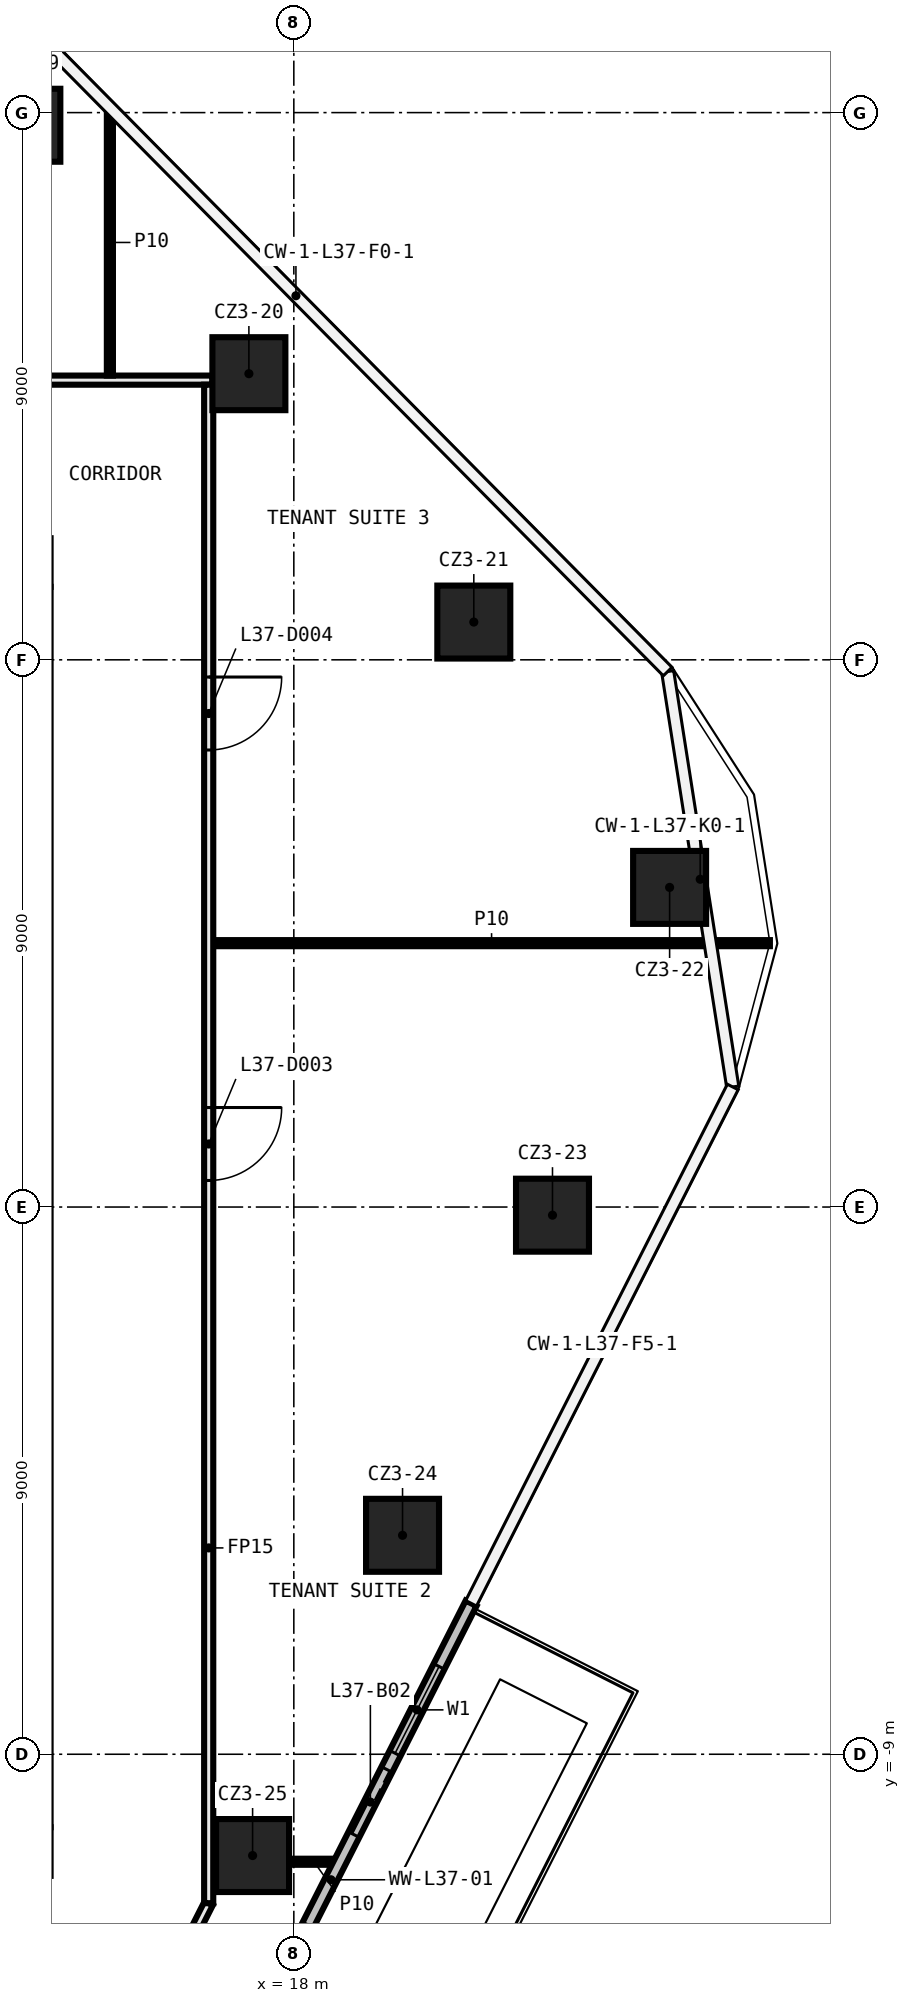
"""IFC4 building model, lengths in metres.
Left out: names, types, materials, properties, quantities, classifications, styles, units other than length and angle.
Written with IfcOpenShell. Run it as: python <this file> out.ifc"""

import sys

from ifc_helpers import new_model, si_unit, direction, frame, frame_2d, origin, origin_2d, place, context, subcontext, project, spatial, rectangle, extrude, element, fill, save


model = new_model("IFC4")
c1 = context("Model", 3, precision=1e-05, world=origin(), true_north=direction((0.0, 1.0)))
c2 = subcontext(c1, "Body", "Model", "MODEL_VIEW")
j1 = project(units=[si_unit("LENGTHUNIT", "METRE"), si_unit("PLANEANGLEUNIT", "RADIAN")], contexts=[c1])
p1 = place(None, origin())
s1 = spatial("IfcSite", under=j1, at=p1, CompositionType="ELEMENT")
p2 = place(p1, origin())
s2 = spatial("IfcBuilding", under=s1, at=p2, CompositionType="ELEMENT")
p3 = place(p2, frame((0.0, 0.0, 171.2)))
s3 = spatial("IfcBuildingStorey", under=s2, at=p3, CompositionType="ELEMENT", Elevation=171.2)
for number, where, z_axis, x_axis in (
    (1, (13.56, 17.792, 0.0), (0.0, 0.0, 1.0), (1.0, 0.0, 0.0)),
    (2, (17.261, 13.706, 0.0), (0.0, 0.0, 1.0), (1.0, 0.0, 0.0)),
    (3, (20.96, 9.621, 0.0), (0.0, 0.0, 1.0), (1.0, 0.0, 0.0)),
    (4, (24.18, 5.257, 0.0), (0.0, 0.0, 1.0), (1.0, 0.0, 0.0)),
    (5, (22.254, -0.134, 0.0), (0.0, 0.0, 1.0), (1.0, 0.0, 0.0)),
    (6, (19.788, -5.399, 0.0), (0.0, 0.0, 1.0), (1.0, 0.0, 0.0)),
    (7, (17.322, -10.666, 0.0), (0.0, 0.0, 1.0), (1.0, 0.0, 0.0)),
):
    element("IfcColumn", number, at=place(p3, frame(where, z_axis=z_axis, x_axis=x_axis)), inside=s3, PredefinedType="COLUMN", context=c2, shape_type="SweptSolid", body=[
        extrude(rectangle(XDim=1.2, YDim=1.2, at=origin_2d()), origin(), (0.0, 0.0, 1.0), 3.82),
    ])
p4 = place(p3, frame((17.922, -10.768, 0.0), z_axis=(0.0, 0.0, 1.0), x_axis=(1.0, 0.0, 0.0)))
e8 = element("IfcWall", 8, at=p4, inside=s3, PredefinedType="PARTITIONING", context=c2, shape_type="SweptSolid", body=[
    extrude(rectangle(XDim=0.817, YDim=0.1, at=frame_2d((0.409, 0.0))), origin(), (0.0, 0.0, 1.0), 3.82),
])
p5 = place(p3, frame((16.675, 4.34, 0.0), z_axis=(0.0, 0.0, 1.0), x_axis=(1.0, 0.0, 0.0)))
e9 = element("IfcWall", 9, at=p5, inside=s3, PredefinedType="PARTITIONING", context=c2, shape_type="SweptSolid", body=[
    extrude(rectangle(XDim=9.154, YDim=0.1, at=frame_2d((4.577, 0.0))), origin(), (0.0, 0.0, 1.0), 3.82),
])
p6 = place(p3, frame((-15.842, 13.6, 0.0), z_axis=(0.0, 0.0, 1.0), x_axis=(1.0, 0.0, 0.0)))
e10 = element("IfcWall", 10, at=p6, inside=s3, PredefinedType="PARTITIONING", context=c2, shape_type="SweptSolid", body=[
    extrude(rectangle(XDim=32.502, YDim=0.15, at=frame_2d((16.251, 0.0))), origin(), (0.0, 0.0, 1.0), 3.82),
])
p7 = place(p6, frame((21.974, 0.0, 0.0)))
e11 = element("IfcOpeningElement", 11, at=p7, cuts=e10, PredefinedType="OPENING", context=c2, shape_type="SweptSolid", body=[
    extrude(rectangle(XDim=1.2, YDim=2.1, at=frame_2d((0.6, 1.05))), frame((0.0, 0.085, 0.0), z_axis=(0.0, -1.0, 0.0), x_axis=(1.0, 0.0, 0.0)), (0.0, 0.0, 1.0), 0.17),
])
p8 = place(p6, frame((5.854, 0.0, 0.0)))
e12 = element("IfcOpeningElement", 12, at=p8, cuts=e10, PredefinedType="OPENING", context=c2, shape_type="SweptSolid", body=[
    extrude(rectangle(XDim=1.2, YDim=2.1, at=frame_2d((0.6, 1.05))), frame((0.0, 0.085, 0.0), z_axis=(0.0, -1.0, 0.0), x_axis=(1.0, 0.0, 0.0)), (0.0, 0.0, 1.0), 0.17),
])
p9 = place(p3, frame((15.511, -13.6, 0.0), z_axis=(0.0, 0.0, 1.0), x_axis=(0.45198735735, 0.892024343163, 0.0)))
e13 = element("IfcWall", 13, at=p9, inside=s3, PredefinedType="PARTITIONING", context=c2, shape_type="SweptSolid", body=[
    extrude(rectangle(XDim=2.411, YDim=0.15, at=frame_2d((1.205, 0.0))), origin(), (0.0, 0.0, 1.0), 3.82),
])
p10 = place(p3, frame((16.6, 13.525, 0.0), z_axis=(0.0, 0.0, 1.0), x_axis=(0.0, -1.0, 0.0)))
e14 = element("IfcWall", 14, at=p10, inside=s3, PredefinedType="PARTITIONING", context=c2, shape_type="SweptSolid", body=[
    extrude(rectangle(XDim=24.975, YDim=0.15, at=frame_2d((12.487, 0.0))), origin(), (0.0, 0.0, 1.0), 3.82),
])
p11 = place(p10, frame((11.888, 0.0, 0.0)))
e15 = element("IfcOpeningElement", 15, at=p11, cuts=e14, PredefinedType="OPENING", context=c2, shape_type="SweptSolid", body=[
    extrude(rectangle(XDim=1.2, YDim=2.1, at=frame_2d((0.6, 1.05))), frame((0.0, 0.085, 0.0), z_axis=(0.0, -1.0, 0.0), x_axis=(1.0, 0.0, 0.0)), (0.0, 0.0, 1.0), 0.17),
])
p12 = place(p10, frame((4.808, 0.0, 0.0)))
e16 = element("IfcOpeningElement", 16, at=p12, cuts=e14, PredefinedType="OPENING", context=c2, shape_type="SweptSolid", body=[
    extrude(rectangle(XDim=1.2, YDim=2.1, at=frame_2d((0.6, 1.05))), frame((0.0, 0.085, 0.0), z_axis=(0.0, -1.0, 0.0), x_axis=(1.0, 0.0, 0.0)), (0.0, 0.0, 1.0), 0.17),
])
p13 = place(p3, frame((14.975, 13.675, 0.0), z_axis=(0.0, 0.0, 1.0), x_axis=(0.0, 1.0, 0.0)))
e17 = element("IfcWall", 17, at=p13, inside=s3, PredefinedType="PARTITIONING", context=c2, shape_type="SweptSolid", body=[
    extrude(rectangle(XDim=4.379, YDim=0.1, at=frame_2d((2.189, 0.0))), origin(), (0.0, 0.0, 1.0), 3.82),
])
p14 = place(p3, frame((16.608, -15.018, 0.0), z_axis=(0.0, 0.0, 1.0), x_axis=(0.452002844598, 0.89201649563, 0.0)))
e18 = element("IfcWall", 18, at=p14, inside=s3, PredefinedType="SOLIDWALL", context=c2, shape_type="SweptSolid", body=[
    extrude(rectangle(XDim=9.53, YDim=0.2, at=frame_2d((4.765, 0.0))), origin(), (0.0, 0.0, 1.0), 3.7),
])
p15 = place(p14, frame((2.0, 0.0, 0.6)))
e19 = element("IfcOpeningElement", 19, at=p15, cuts=e18, PredefinedType="OPENING", context=c2, shape_type="SweptSolid", body=[
    extrude(rectangle(XDim=1.6, YDim=2.4, at=frame_2d((0.8, 1.2))), frame((0.0, 0.11, 0.0), z_axis=(0.0, -1.0, 0.0), x_axis=(1.0, 0.0, 0.0)), (0.0, 0.0, 1.0), 0.22),
])
p16 = place(p14, frame((0.5, 0.0, 0.0)))
e20 = element("IfcOpeningElement", 20, at=p16, cuts=e18, PredefinedType="OPENING", context=c2, shape_type="SweptSolid", body=[
    extrude(rectangle(XDim=1.2, YDim=2.4, at=frame_2d((0.6, 1.2))), frame((0.0, 0.11, 0.0), z_axis=(0.0, -1.0, 0.0), x_axis=(1.0, 0.0, 0.0)), (0.0, 0.0, 1.0), 0.22),
])
p17 = place(p14, frame((6.765, 0.0, 0.6)))
e21 = element("IfcOpeningElement", 21, at=p17, cuts=e18, PredefinedType="OPENING", context=c2, shape_type="SweptSolid", body=[
    extrude(rectangle(XDim=1.6, YDim=2.4, at=frame_2d((0.8, 1.2))), frame((0.0, 0.11, 0.0), z_axis=(0.0, -1.0, 0.0), x_axis=(1.0, 0.0, 0.0)), (0.0, 0.0, 1.0), 0.22),
])
p18 = place(p14, frame((5.265, 0.0, 0.0)))
e22 = element("IfcOpeningElement", 22, at=p18, cuts=e18, PredefinedType="OPENING", context=c2, shape_type="SweptSolid", body=[
    extrude(rectangle(XDim=1.2, YDim=2.4, at=frame_2d((0.6, 1.2))), frame((0.0, 0.11, 0.0), z_axis=(0.0, -1.0, 0.0), x_axis=(1.0, 0.0, 0.0)), (0.0, 0.0, 1.0), 0.22),
])
p19 = place(p11, origin())
e23 = element("IfcDoor", 23, at=p19, inside=s3, OperationType="SINGLE_SWING_RIGHT", PredefinedType="DOOR", context=c2, shape_type="SweptSolid", body=[
    extrude(rectangle(XDim=1.2, YDim=2.1, at=frame_2d((0.6, 1.05))), frame((0.0, 0.025, 0.0), z_axis=(0.0, -1.0, 0.0), x_axis=(1.0, 0.0, 0.0)), (0.0, 0.0, 1.0), 0.05),
])
fill(e15, e23)
p20 = place(p12, origin())
e24 = element("IfcDoor", 24, at=p20, inside=s3, OperationType="SINGLE_SWING_LEFT", PredefinedType="DOOR", context=c2, shape_type="SweptSolid", body=[
    extrude(rectangle(XDim=1.2, YDim=2.1, at=frame_2d((0.6, 1.05))), frame((0.0, 0.025, 0.0), z_axis=(0.0, -1.0, 0.0), x_axis=(1.0, 0.0, 0.0)), (0.0, 0.0, 1.0), 0.05),
])
fill(e16, e24)
p21 = place(p17, origin())
e25 = element("IfcWindow", 25, at=p21, inside=s3, PartitioningType="SINGLE_PANEL", PredefinedType="WINDOW", context=c2, shape_type="SweptSolid", body=[
    extrude(rectangle(XDim=1.6, YDim=2.4, at=frame_2d((0.8, 1.2))), frame((0.0, 0.03, 0.0), z_axis=(0.0, -1.0, 0.0), x_axis=(1.0, 0.0, 0.0)), (0.0, 0.0, 1.0), 0.06),
])
fill(e21, e25)
p22 = place(p18, origin())
e26 = element("IfcDoor", 26, at=p22, inside=s3, OperationType="SLIDING_TO_LEFT", PredefinedType="DOOR", context=c2, shape_type="SweptSolid", body=[
    extrude(rectangle(XDim=1.2, YDim=2.4, at=frame_2d((0.6, 1.2))), frame((0.0, 0.025, 0.0), z_axis=(0.0, -1.0, 0.0), x_axis=(1.0, 0.0, 0.0)), (0.0, 0.0, 1.0), 0.05),
])
fill(e22, e26)
save(model, sys.argv[1])
